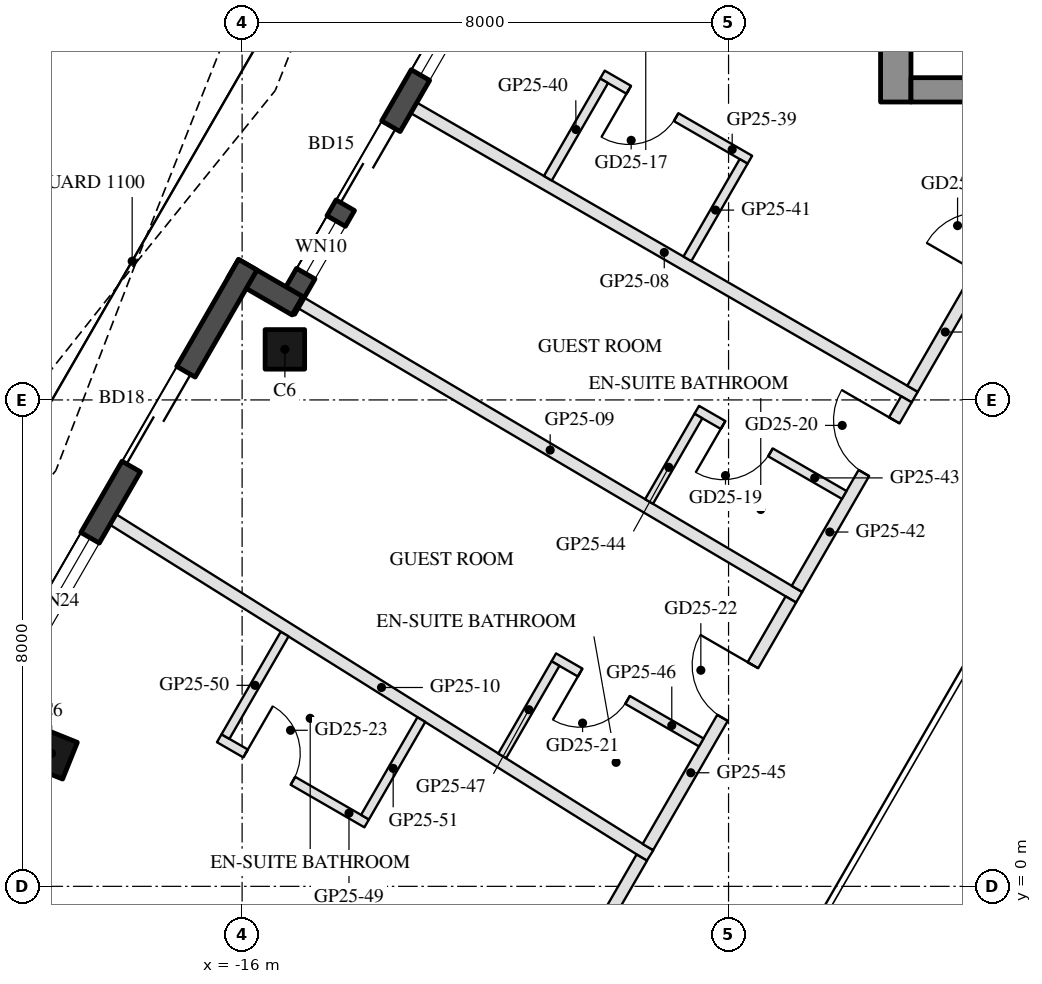
"""IFC4 building model, lengths in metres.
Left out: names, types, materials, properties, quantities, classifications, styles, units other than length and angle.
Written with IfcOpenShell. Run it as: python <this file> out.ifc"""

import sys

from ifc_helpers import new_model, si_unit, direction, frame, frame_2d, origin, origin_2d, place, context, subcontext, project, spatial, rectangle, hollow_rectangle, extrude, boolean, halfspace, element, fill, save


model = new_model("IFC4")
c1 = context("Model", 3, precision=1e-05, world=origin(), true_north=direction((0.0, 1.0)))
c2 = subcontext(c1, "Body", "Model", "MODEL_VIEW")
j1 = project(units=[si_unit("LENGTHUNIT", "METRE"), si_unit("PLANEANGLEUNIT", "RADIAN")], contexts=[c1])
p1 = place(None, origin())
s1 = spatial("IfcSite", under=j1, at=p1, CompositionType="ELEMENT")
p2 = place(p1, origin())
s2 = spatial("IfcBuilding", under=s1, at=p2, CompositionType="ELEMENT")
p3 = place(p2, frame((0.0, 0.0, 265.2)))
s3 = spatial("IfcBuildingStorey", under=s2, at=p3, CompositionType="ELEMENT", Elevation=265.2)
p4 = place(p3, frame((-15.296, 8.832, 0.0), z_axis=(0.131164091109, -0.075789494713, 0.988459373821), x_axis=(0.500216662939, 0.865900277091, 1.5863597e-05)))
e1 = element("IfcColumn", 1, at=p4, inside=s3, PredefinedType="COLUMN", context=c2, shape_type="SweptSolid", body=[
    boolean("DIFFERENCE", boolean("DIFFERENCE", extrude(hollow_rectangle(XDim=0.65, YDim=0.65, WallThickness=0.03, at=origin_2d()), origin(), (0.0, 0.0, 1.0), 3.743), halfspace(frame((0.0, 0.0, 0.037), z_axis=(0.0, 0.0, 1.0), x_axis=(1.0, 0.0, 0.0)), True)), halfspace(frame((0.0, 0.0, 3.706), z_axis=(0.0, 0.0, 1.0), x_axis=(1.0, 0.0, 0.0)), False)),
])
p5 = place(p3, frame((-19.132, 2.188, 0.0), z_axis=(0.161388519526, -0.022915997932, 0.986624854139), x_axis=(-0.495109873729, -0.866696335889, 0.060857820306)))
e2 = element("IfcColumn", 2, at=p5, inside=s3, PredefinedType="COLUMN", context=c2, shape_type="SweptSolid", body=[
    boolean("DIFFERENCE", boolean("DIFFERENCE", extrude(hollow_rectangle(XDim=0.65, YDim=0.65, WallThickness=0.03, at=origin_2d()), origin(), (0.0, 0.0, 1.0), 3.75), halfspace(frame((0.0, 0.0, 0.04), z_axis=(0.0, 0.0, 1.0), x_axis=(1.0, 0.0, 0.0)), True)), halfspace(frame((0.0, 0.0, 3.71), z_axis=(0.0, 0.0, 1.0), x_axis=(1.0, 0.0, 0.0)), False)),
])
p6 = place(p3, frame((-12.032, 15.136, 0.0), z_axis=(0.0, 0.0, 1.0), x_axis=(-0.500005870429, -0.866022014464, 0.0)))
e3 = element("IfcWall", 3, at=p6, inside=s3, PredefinedType="SOLIDWALL", context=c2, shape_type="SweptSolid", body=[
    extrude(rectangle(XDim=6.512, YDim=0.35, at=frame_2d((3.256, 0.0))), origin(), (0.0, 0.0, 1.0), 3.55),
])
p7 = place(p6, frame((0.77, 0.0, 0.3)))
e4 = element("IfcOpeningElement", 4, at=p7, cuts=e3, PredefinedType="OPENING", context=c2, shape_type="SweptSolid", body=[
    extrude(rectangle(XDim=1.3, YDim=2.65, at=frame_2d((0.65, 1.325))), frame((0.0, 0.185, 0.0), z_axis=(0.0, -1.0, 0.0), x_axis=(1.0, 0.0, 0.0)), (0.0, 0.0, 1.0), 0.37),
])
p8 = place(p6, frame((3.042, 0.0, 0.0)))
e5 = element("IfcOpeningElement", 5, at=p8, cuts=e3, PredefinedType="OPENING", context=c2, shape_type="SweptSolid", body=[
    extrude(rectangle(XDim=1.5, YDim=2.4, at=frame_2d((0.75, 1.2))), frame((0.0, 0.185, 0.0), z_axis=(0.0, -1.0, 0.0), x_axis=(1.0, 0.0, 0.0)), (0.0, 0.0, 1.0), 0.37),
])
p9 = place(p6, frame((4.842, 0.0, 0.3)))
e6 = element("IfcOpeningElement", 6, at=p9, cuts=e3, PredefinedType="OPENING", context=c2, shape_type="SweptSolid", body=[
    extrude(rectangle(XDim=1.0, YDim=2.65, at=frame_2d((0.5, 1.325))), frame((0.0, 0.185, 0.0), z_axis=(0.0, -1.0, 0.0), x_axis=(1.0, 0.0, 0.0)), (0.0, 0.0, 1.0), 0.37),
])
p10 = place(p3, frame((-15.09, 9.549, 0.0), z_axis=(0.0, 0.0, 1.0), x_axis=(-0.866092288191, 0.499884134912, 0.0)))
e7 = element("IfcWall", 7, at=p10, inside=s3, PredefinedType="SOLIDWALL", context=c2, shape_type="SweptSolid", body=[
    extrude(rectangle(XDim=1.22, YDim=0.35, at=frame_2d((0.61, 0.0))), origin(), (0.0, 0.0, 1.0), 3.55),
])
p11 = place(p3, frame((-15.907, 10.223, 0.0), z_axis=(0.0, 0.0, 1.0), x_axis=(-0.499992427901, -0.866029775494, 0.0)))
e8 = element("IfcWall", 8, at=p11, inside=s3, PredefinedType="SOLIDWALL", context=c2, shape_type="SweptSolid", body=[
    extrude(rectangle(XDim=9.472, YDim=0.35, at=frame_2d((4.736, 0.0))), origin(), (0.0, 0.0, 1.0), 3.55),
])
p12 = place(p11, frame((2.032, 0.0, 0.0)))
e9 = element("IfcOpeningElement", 9, at=p12, cuts=e8, PredefinedType="OPENING", context=c2, shape_type="SweptSolid", body=[
    extrude(rectangle(XDim=1.8, YDim=2.4, at=frame_2d((0.9, 1.2))), frame((0.0, 0.185, 0.0), z_axis=(0.0, -1.0, 0.0), x_axis=(1.0, 0.0, 0.0)), (0.0, 0.0, 1.0), 0.37),
])
p13 = place(p11, frame((5.186, 0.0, 0.3)))
e10 = element("IfcOpeningElement", 10, at=p13, cuts=e8, PredefinedType="OPENING", context=c2, shape_type="SweptSolid", body=[
    extrude(rectangle(XDim=2.4, YDim=2.65, at=frame_2d((1.2, 1.325))), frame((0.0, 0.185, 0.0), z_axis=(0.0, -1.0, 0.0), x_axis=(1.0, 0.0, 0.0)), (0.0, 0.0, 1.0), 0.37),
])
p14 = place(p3, frame((-5.25, 12.9, 0.0), z_axis=(0.0, 0.0, 1.0), x_axis=(0.0, 1.0, 0.0)))
e11 = element("IfcWall", 11, at=p14, inside=s3, PredefinedType="SHEAR", context=c2, shape_type="SweptSolid", body=[
    extrude(rectangle(XDim=13.934, YDim=0.5, at=frame_2d((6.967, 0.0))), origin(), (0.0, 0.0, 1.0), 3.5),
])
p15 = place(p3, frame((5.0, 13.1, 0.0), z_axis=(0.0, 0.0, 1.0), x_axis=(-1.0, 0.0, 0.0)))
e12 = element("IfcWall", 12, at=p15, inside=s3, PredefinedType="SHEAR", context=c2, shape_type="SweptSolid", body=[
    extrude(rectangle(XDim=10.0, YDim=0.4, at=frame_2d((5.0, 0.0))), origin(), (0.0, 0.0, 1.0), 3.5),
])
p16 = place(p15, frame((3.55, 0.0, 0.0)))
e13 = element("IfcOpeningElement", 13, at=p16, cuts=e12, PredefinedType="OPENING", context=c2, shape_type="SweptSolid", body=[
    extrude(rectangle(XDim=1.1, YDim=2.1, at=frame_2d((0.55, 1.05))), frame((0.0, 0.21, 0.0), z_axis=(0.0, -1.0, 0.0), x_axis=(1.0, 0.0, 0.0)), (0.0, 0.0, 1.0), 0.42),
])
p17 = place(p15, frame((5.85, 0.0, 0.0)))
e14 = element("IfcOpeningElement", 14, at=p17, cuts=e12, PredefinedType="OPENING", context=c2, shape_type="SweptSolid", body=[
    extrude(rectangle(XDim=1.4, YDim=2.1, at=frame_2d((0.7, 1.05))), frame((0.0, 0.21, 0.0), z_axis=(0.0, -1.0, 0.0), x_axis=(1.0, 0.0, 0.0)), (0.0, 0.0, 1.0), 0.42),
])
p18 = place(p3, frame((-13.177, 12.804, 0.0), z_axis=(0.0, 0.0, 1.0), x_axis=(0.866021901412, -0.500006066238, 0.0)))
e15 = element("IfcWall", 15, at=p18, inside=s3, PredefinedType="PARTITIONING", context=c2, shape_type="SweptSolid", body=[
    extrude(rectangle(XDim=9.513, YDim=0.2, at=frame_2d((4.757, 0.0))), origin(), (0.0, 0.0, 1.0), 3.1),
])
p19 = place(p3, frame((-15.029, 9.596, 0.0), z_axis=(0.0, 0.0, 1.0), x_axis=(0.860830464323, -0.508891846754, 0.0)))
e16 = element("IfcWall", 16, at=p19, inside=s3, PredefinedType="PARTITIONING", context=c2, shape_type="SweptSolid", body=[
    extrude(rectangle(XDim=9.513, YDim=0.2, at=frame_2d((4.757, 0.0))), origin(), (0.0, 0.0, 1.0), 3.1),
])
p20 = place(p3, frame((-18.124, 6.034, 0.0), z_axis=(0.0, 0.0, 1.0), x_axis=(0.847667734063, -0.530527485271, 0.0)))
e17 = element("IfcWall", 17, at=p20, inside=s3, PredefinedType="PARTITIONING", context=c2, shape_type="SweptSolid", body=[
    extrude(rectangle(XDim=10.419, YDim=0.2, at=frame_2d((5.21, 0.0))), origin(), (0.0, 0.0, 1.0), 3.0),
])
p21 = place(p3, frame((-4.975, 8.184, 0.0), z_axis=(0.0, 0.0, 1.0), x_axis=(0.499983925036, 0.86603468447, 0.0)))
e18 = element("IfcWall", 18, at=p21, inside=s3, PredefinedType="PARTITIONING", context=c2, shape_type="SweptSolid", body=[
    extrude(rectangle(XDim=5.388, YDim=0.2, at=frame_2d((2.694, 0.0))), origin(), (0.0, 0.0, 1.0), 3.0),
])
p22 = place(p21, frame((2.194, 0.0, 0.0)))
e19 = element("IfcOpeningElement", 19, at=p22, cuts=e18, PredefinedType="OPENING", context=c2, shape_type="SweptSolid", body=[
    extrude(rectangle(XDim=1.0, YDim=2.1, at=frame_2d((0.5, 1.05))), frame((0.0, 0.11, 0.0), z_axis=(0.0, -1.0, 0.0), x_axis=(1.0, 0.0, 0.0)), (0.0, 0.0, 1.0), 0.22),
])
p23 = place(p3, frame((-7.649, 11.951, 0.0), z_axis=(0.0, 0.0, 1.0), x_axis=(-0.865996816683, 0.500049511043, 0.0)))
e20 = element("IfcWall", 20, at=p23, inside=s3, PredefinedType="PARTITIONING", context=c2, shape_type="SweptSolid", body=[
    extrude(rectangle(XDim=2.8, YDim=0.15, at=frame_2d((1.4, 0.0))), origin(), (0.0, 0.0, 1.0), 3.55),
])
p24 = place(p23, frame((1.4, 0.0, 0.0)))
e21 = element("IfcOpeningElement", 21, at=p24, cuts=e20, PredefinedType="OPENING", context=c2, shape_type="SweptSolid", body=[
    extrude(rectangle(XDim=0.9, YDim=2.1, at=frame_2d((0.45, 1.05))), frame((0.0, 0.085, 0.0), z_axis=(0.0, -1.0, 0.0), x_axis=(1.0, 0.0, 0.0)), (0.0, 0.0, 1.0), 0.17),
])
for number, where, z_axis, x_axis in (
    (22, (-10.047, 13.248, 0.0), (0.0, 0.0, 1.0), (-0.5, -0.866, 0.0)),
    (23, (-7.752, 11.923, 0.0), (0.0, 0.0, 1.0), (-0.5, -0.866, 0.0)),
):
    element("IfcWall", number, at=place(p3, frame(where, z_axis=z_axis, x_axis=x_axis)), inside=s3, PredefinedType="PARTITIONING", context=c2, shape_type="SweptSolid", body=[
        extrude(rectangle(XDim=1.85, YDim=0.15, at=frame_2d((0.925, 0.0))), origin(), (0.0, 0.0, 1.0), 3.55),
    ])
p25 = place(p3, frame((-6.875, 4.892, 0.0), z_axis=(0.0, 0.0, 1.0), x_axis=(0.499945471869, 0.866056883327, 0.0)))
e24 = element("IfcWall", 24, at=p25, inside=s3, PredefinedType="PARTITIONING", context=c2, shape_type="SweptSolid", body=[
    extrude(rectangle(XDim=3.601, YDim=0.2, at=frame_2d((1.801, 0.0))), origin(), (0.0, 0.0, 1.0), 3.0),
])
p26 = place(p25, frame((2.201, 0.0, 0.0)))
e25 = element("IfcOpeningElement", 25, at=p26, cuts=e24, PredefinedType="OPENING", context=c2, shape_type="SweptSolid", body=[
    extrude(rectangle(XDim=1.0, YDim=2.1, at=frame_2d((0.5, 1.05))), frame((0.0, 0.11, 0.0), z_axis=(0.0, -1.0, 0.0), x_axis=(1.0, 0.0, 0.0)), (0.0, 0.0, 1.0), 0.22),
])
p27 = place(p3, frame((-6.098, 6.438, 0.0), z_axis=(0.0, 0.0, 1.0), x_axis=(-0.866018616679, 0.500011755427, 0.0)))
e26 = element("IfcWall", 26, at=p27, inside=s3, PredefinedType="PARTITIONING", context=c2, shape_type="SweptSolid", body=[
    extrude(rectangle(XDim=2.8, YDim=0.15, at=frame_2d((1.4, 0.0))), origin(), (0.0, 0.0, 1.0), 3.55),
])
p28 = place(p27, frame((1.4, 0.0, 0.0)))
e27 = element("IfcOpeningElement", 27, at=p28, cuts=e26, PredefinedType="OPENING", context=c2, shape_type="SweptSolid", body=[
    extrude(rectangle(XDim=0.9, YDim=2.1, at=frame_2d((0.45, 1.05))), frame((0.0, 0.085, 0.0), z_axis=(0.0, -1.0, 0.0), x_axis=(1.0, 0.0, 0.0)), (0.0, 0.0, 1.0), 0.17),
])
p29 = place(p3, frame((-8.496, 7.735, 0.0), z_axis=(0.0, 0.0, 1.0), x_axis=(-0.500021943523, -0.866012734315, 0.0)))
e28 = element("IfcWall", 28, at=p29, inside=s3, PredefinedType="PARTITIONING", context=c2, shape_type="SweptSolid", body=[
    extrude(rectangle(XDim=1.623, YDim=0.15, at=frame_2d((0.812, 0.0))), origin(), (0.0, 0.0, 1.0), 3.55),
])
p30 = place(p3, frame((-9.326, 0.646, 0.0), z_axis=(0.0, 0.0, 1.0), x_axis=(0.500008572427, 0.866020454435, 0.0)))
e29 = element("IfcWall", 29, at=p30, inside=s3, PredefinedType="PARTITIONING", context=c2, shape_type="SweptSolid", body=[
    extrude(rectangle(XDim=4.703, YDim=0.2, at=frame_2d((2.351, 0.0))), origin(), (0.0, 0.0, 1.0), 3.0),
])
p31 = place(p30, frame((2.454, 0.0, 0.0)))
e30 = element("IfcOpeningElement", 30, at=p31, cuts=e29, PredefinedType="OPENING", context=c2, shape_type="SweptSolid", body=[
    extrude(rectangle(XDim=1.0, YDim=2.1, at=frame_2d((0.5, 1.05))), frame((0.0, 0.11, 0.0), z_axis=(0.0, -1.0, 0.0), x_axis=(1.0, 0.0, 0.0)), (0.0, 0.0, 1.0), 0.22),
])
p32 = place(p3, frame((-8.449, 2.366, 0.0), z_axis=(0.0, 0.0, 1.0), x_axis=(-0.866034573852, 0.49998411664, 0.0)))
e31 = element("IfcWall", 31, at=p32, inside=s3, PredefinedType="PARTITIONING", context=c2, shape_type="SweptSolid", body=[
    extrude(rectangle(XDim=2.8, YDim=0.15, at=frame_2d((1.4, 0.0))), origin(), (0.0, 0.0, 1.0), 3.55),
])
p33 = place(p32, frame((1.4, 0.0, 0.0)))
e32 = element("IfcOpeningElement", 32, at=p33, cuts=e31, PredefinedType="OPENING", context=c2, shape_type="SweptSolid", body=[
    extrude(rectangle(XDim=0.9, YDim=2.1, at=frame_2d((0.45, 1.05))), frame((0.0, 0.085, 0.0), z_axis=(0.0, -1.0, 0.0), x_axis=(1.0, 0.0, 0.0)), (0.0, 0.0, 1.0), 0.17),
])
p34 = place(p3, frame((-10.846, 3.664, 0.0), z_axis=(0.0, 0.0, 1.0), x_axis=(-0.499899295206, -0.866083537918, 0.0)))
e33 = element("IfcWall", 33, at=p34, inside=s3, PredefinedType="PARTITIONING", context=c2, shape_type="SweptSolid", body=[
    extrude(rectangle(XDim=1.753, YDim=0.15, at=frame_2d((0.876, 0.0))), origin(), (0.0, 0.0, 1.0), 3.0),
])
p35 = place(p3, frame((-12.269, -4.45, 0.0), z_axis=(0.0, 0.0, 1.0), x_axis=(0.500009958894, 0.866019653938, 0.0)))
e34 = element("IfcWall", 34, at=p35, inside=s3, PredefinedType="PARTITIONING", context=c2, shape_type="SweptSolid", body=[
    extrude(rectangle(XDim=5.685, YDim=0.2, at=frame_2d((2.842, 0.0))), origin(), (0.0, 0.0, 1.0), 3.0),
])
p36 = place(p35, frame((2.342, 0.0, 0.0)))
e35 = element("IfcOpeningElement", 35, at=p36, cuts=e34, PredefinedType="OPENING", context=c2, shape_type="SweptSolid", body=[
    extrude(rectangle(XDim=1.0, YDim=2.1, at=frame_2d((0.5, 1.05))), frame((0.0, 0.11, 0.0), z_axis=(0.0, -1.0, 0.0), x_axis=(1.0, 0.0, 0.0)), (0.0, 0.0, 1.0), 0.22),
])
p37 = place(p3, frame((-16.376, 2.436, 0.0), z_axis=(0.0, 0.0, 1.0), x_axis=(0.865996816683, -0.500049511043, 0.0)))
e36 = element("IfcWall", 36, at=p37, inside=s3, PredefinedType="PARTITIONING", context=c2, shape_type="SweptSolid", body=[
    extrude(rectangle(XDim=2.8, YDim=0.15, at=frame_2d((1.4, 0.0))), origin(), (0.0, 0.0, 1.0), 3.55),
])
p38 = place(p37, frame((0.5, 0.0, 0.0)))
e37 = element("IfcOpeningElement", 37, at=p38, cuts=e36, PredefinedType="OPENING", context=c2, shape_type="SweptSolid", body=[
    extrude(rectangle(XDim=0.9, YDim=2.1, at=frame_2d((0.45, 1.05))), frame((0.0, 0.085, 0.0), z_axis=(0.0, -1.0, 0.0), x_axis=(1.0, 0.0, 0.0)), (0.0, 0.0, 1.0), 0.17),
])
p39 = place(p3, frame((-15.3, 4.149, 0.0), z_axis=(0.0, 0.0, 1.0), x_axis=(-0.49987439993, -0.866097906876, 0.0)))
e38 = element("IfcWall", 38, at=p39, inside=s3, PredefinedType="PARTITIONING", context=c2, shape_type="SweptSolid", body=[
    extrude(rectangle(XDim=1.947, YDim=0.15, at=frame_2d((0.974, 0.0))), origin(), (0.0, 0.0, 1.0), 3.55),
])
p40 = place(p3, frame((-13.052, 2.742, 0.0), z_axis=(0.0, 0.0, 1.0), x_axis=(-0.499965806267, -0.866045144646, 0.0)))
e39 = element("IfcWall", 39, at=p40, inside=s3, PredefinedType="PARTITIONING", context=c2, shape_type="SweptSolid", body=[
    extrude(rectangle(XDim=1.853, YDim=0.15, at=frame_2d((0.926, 0.0))), origin(), (0.0, 0.0, 1.0), 3.55),
])
p41 = place(p7, origin())
e40 = element("IfcWindow", 40, at=p41, inside=s3, PartitioningType="SINGLE_PANEL", PredefinedType="WINDOW", context=c2, shape_type="SweptSolid", body=[
    extrude(rectangle(XDim=1.3, YDim=2.65, at=frame_2d((0.65, 1.325))), frame((0.0, 0.03, 0.0), z_axis=(0.0, -1.0, 0.0), x_axis=(1.0, 0.0, 0.0)), (0.0, 0.0, 1.0), 0.06),
])
fill(e4, e40)
p42 = place(p8, frame((1.5, 0.0, 0.0), z_axis=(0.0, 0.0, 1.0), x_axis=(-1.0, 0.0, 0.0)))
e41 = element("IfcDoor", 41, at=p42, inside=s3, OperationType="SLIDING_TO_LEFT", PredefinedType="DOOR", context=c2, shape_type="SweptSolid", body=[
    extrude(rectangle(XDim=1.5, YDim=2.4, at=frame_2d((0.75, 1.2))), frame((0.0, 0.025, 0.0), z_axis=(0.0, -1.0, 0.0), x_axis=(1.0, 0.0, 0.0)), (0.0, 0.0, 1.0), 0.05),
])
fill(e5, e41)
p43 = place(p9, origin())
e42 = element("IfcWindow", 42, at=p43, inside=s3, PartitioningType="SINGLE_PANEL", PredefinedType="WINDOW", context=c2, shape_type="SweptSolid", body=[
    extrude(rectangle(XDim=1.0, YDim=2.65, at=frame_2d((0.5, 1.325))), frame((0.0, 0.03, 0.0), z_axis=(0.0, -1.0, 0.0), x_axis=(1.0, 0.0, 0.0)), (0.0, 0.0, 1.0), 0.06),
])
fill(e6, e42)
p44 = place(p12, frame((1.8, 0.0, 0.0), z_axis=(0.0, 0.0, 1.0), x_axis=(-1.0, 0.0, 0.0)))
e43 = element("IfcDoor", 43, at=p44, inside=s3, OperationType="SLIDING_TO_LEFT", PredefinedType="DOOR", context=c2, shape_type="SweptSolid", body=[
    extrude(rectangle(XDim=1.8, YDim=2.4, at=frame_2d((0.9, 1.2))), frame((0.0, 0.025, 0.0), z_axis=(0.0, -1.0, 0.0), x_axis=(1.0, 0.0, 0.0)), (0.0, 0.0, 1.0), 0.05),
])
fill(e9, e43)
p45 = place(p13, origin())
e44 = element("IfcWindow", 44, at=p45, inside=s3, PartitioningType="SINGLE_PANEL", PredefinedType="WINDOW", context=c2, shape_type="SweptSolid", body=[
    extrude(rectangle(XDim=2.4, YDim=2.65, at=frame_2d((1.2, 1.325))), frame((0.0, 0.03, 0.0), z_axis=(0.0, -1.0, 0.0), x_axis=(1.0, 0.0, 0.0)), (0.0, 0.0, 1.0), 0.06),
])
fill(e10, e44)
p46 = place(p24, origin())
e45 = element("IfcDoor", 45, at=p46, inside=s3, OperationType="SINGLE_SWING_RIGHT", PredefinedType="DOOR", context=c2, shape_type="SweptSolid", body=[
    extrude(rectangle(XDim=0.9, YDim=2.1, at=frame_2d((0.45, 1.05))), frame((0.0, 0.025, 0.0), z_axis=(0.0, -1.0, 0.0), x_axis=(1.0, 0.0, 0.0)), (0.0, 0.0, 1.0), 0.05),
])
fill(e21, e45)
p47 = place(p28, origin())
e46 = element("IfcDoor", 46, at=p47, inside=s3, OperationType="SINGLE_SWING_RIGHT", PredefinedType="DOOR", context=c2, shape_type="SweptSolid", body=[
    extrude(rectangle(XDim=0.9, YDim=2.1, at=frame_2d((0.45, 1.05))), frame((0.0, 0.025, 0.0), z_axis=(0.0, -1.0, 0.0), x_axis=(1.0, 0.0, 0.0)), (0.0, 0.0, 1.0), 0.05),
])
fill(e27, e46)
p48 = place(p26, origin())
e47 = element("IfcDoor", 47, at=p48, inside=s3, OperationType="SINGLE_SWING_RIGHT", PredefinedType="DOOR", context=c2, shape_type="SweptSolid", body=[
    extrude(rectangle(XDim=1.0, YDim=2.1, at=frame_2d((0.5, 1.05))), frame((0.0, 0.025, 0.0), z_axis=(0.0, -1.0, 0.0), x_axis=(1.0, 0.0, 0.0)), (0.0, 0.0, 1.0), 0.05),
])
fill(e25, e47)
p49 = place(p33, origin())
e48 = element("IfcDoor", 48, at=p49, inside=s3, OperationType="SINGLE_SWING_RIGHT", PredefinedType="DOOR", context=c2, shape_type="SweptSolid", body=[
    extrude(rectangle(XDim=0.9, YDim=2.1, at=frame_2d((0.45, 1.05))), frame((0.0, 0.025, 0.0), z_axis=(0.0, -1.0, 0.0), x_axis=(1.0, 0.0, 0.0)), (0.0, 0.0, 1.0), 0.05),
])
fill(e32, e48)
p50 = place(p31, origin())
e49 = element("IfcDoor", 49, at=p50, inside=s3, OperationType="SINGLE_SWING_RIGHT", PredefinedType="DOOR", context=c2, shape_type="SweptSolid", body=[
    extrude(rectangle(XDim=1.0, YDim=2.1, at=frame_2d((0.5, 1.05))), frame((0.0, 0.025, 0.0), z_axis=(0.0, -1.0, 0.0), x_axis=(1.0, 0.0, 0.0)), (0.0, 0.0, 1.0), 0.05),
])
fill(e30, e49)
p51 = place(p38, origin())
e50 = element("IfcDoor", 50, at=p51, inside=s3, OperationType="SINGLE_SWING_LEFT", PredefinedType="DOOR", context=c2, shape_type="SweptSolid", body=[
    extrude(rectangle(XDim=0.9, YDim=2.1, at=frame_2d((0.45, 1.05))), frame((0.0, 0.025, 0.0), z_axis=(0.0, -1.0, 0.0), x_axis=(1.0, 0.0, 0.0)), (0.0, 0.0, 1.0), 0.05),
])
fill(e37, e50)
save(model, sys.argv[1])
